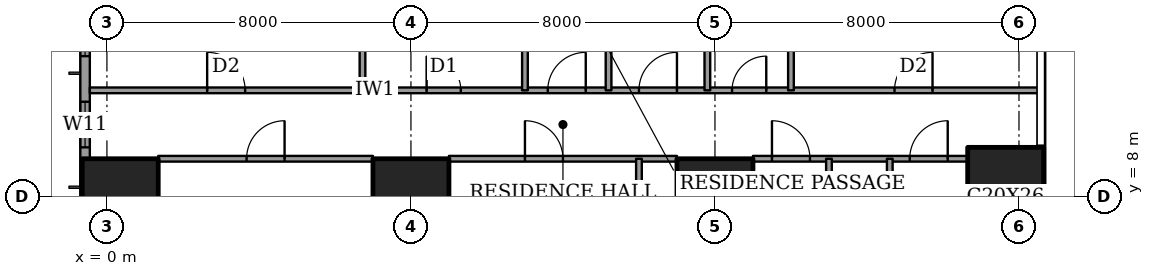
"""IFC4 building model, lengths in metres.
Left out: names, types, materials, properties, quantities, classifications, styles, units other than length and angle.
Written with IfcOpenShell. Run it as: python <this file> out.ifc"""

import sys

from ifc_helpers import new_model, si_unit, direction, frame, frame_2d, origin, origin_2d, place, context, subcontext, project, spatial, rectangle, extrude, element, fill, save


model = new_model("IFC4")
c1 = context("Model", 3, precision=1e-05, world=origin(), true_north=direction((0.0, 1.0)))
c2 = subcontext(c1, "Body", "Model", "MODEL_VIEW")
j1 = project(units=[si_unit("LENGTHUNIT", "METRE"), si_unit("PLANEANGLEUNIT", "RADIAN")], contexts=[c1])
p1 = place(None, origin())
s1 = spatial("IfcSite", under=j1, at=p1, CompositionType="ELEMENT")
p2 = place(p1, origin())
s2 = spatial("IfcBuilding", under=s1, at=p2, CompositionType="ELEMENT")
p3 = place(p2, frame((0.0, 0.0, 96.2)))
s3 = spatial("IfcBuildingStorey", under=s2, at=p3, CompositionType="ELEMENT", Elevation=96.2)
for number, where, z_axis, x_axis in (
    (1, (0.35, 8.0, 0.0), (0.0, 0.0, 1.0), (1.0, 0.0, 0.0)),
    (2, (8.0, 8.0, 0.0), (0.0, 0.0, 1.0), (1.0, 0.0, 0.0)),
    (3, (16.0, 8.0, 0.0), (0.0, 0.0, 1.0), (1.0, 0.0, 0.0)),
):
    element("IfcColumn", number, at=place(p3, frame(where, z_axis=z_axis, x_axis=x_axis)), inside=s3, PredefinedType="COLUMN", context=c2, shape_type="SweptSolid", body=[
        extrude(rectangle(XDim=2.0, YDim=2.0, at=origin_2d()), origin(), (0.0, 0.0, 1.0), 3.6),
    ])
p4 = place(p3, frame((23.65, 8.0, 0.0), z_axis=(0.0, 0.0, 1.0), x_axis=(1.0, 0.0, 0.0)))
e4 = element("IfcColumn", 4, at=p4, inside=s3, PredefinedType="COLUMN", context=c2, shape_type="SweptSolid", body=[
    extrude(rectangle(XDim=2.0, YDim=2.6, at=origin_2d()), origin(), (0.0, 0.0, 1.0), 3.6),
])
p5 = place(p3, frame((-0.575, 44.825, 0.0), z_axis=(0.0, 0.0, 1.0), x_axis=(0.0, -1.0, 0.0)))
e5 = element("IfcWall", 5, at=p5, inside=s3, PredefinedType="SOLIDWALL", context=c2, shape_type="SweptSolid", body=[
    extrude(rectangle(XDim=41.65, YDim=0.25, at=frame_2d((20.825, 0.0))), origin(), (0.0, 0.0, 1.0), 3.6),
])
p6 = place(p5, frame((0.775, 0.0, 0.4)))
e6 = element("IfcOpeningElement", 6, at=p6, cuts=e5, PredefinedType="OPENING", context=c2, shape_type="SweptSolid", body=[
    extrude(rectangle(XDim=2.4, YDim=2.2, at=frame_2d((1.2, 1.1))), frame((0.0, 0.135, 0.0), z_axis=(0.0, -1.0, 0.0), x_axis=(1.0, 0.0, 0.0)), (0.0, 0.0, 1.0), 0.27),
])
p7 = place(p5, frame((6.1, 0.0, 0.4)))
e7 = element("IfcOpeningElement", 7, at=p7, cuts=e5, PredefinedType="OPENING", context=c2, shape_type="SweptSolid", body=[
    extrude(rectangle(XDim=1.2, YDim=2.2, at=frame_2d((0.6, 1.1))), frame((0.0, 0.135, 0.0), z_axis=(0.0, -1.0, 0.0), x_axis=(1.0, 0.0, 0.0)), (0.0, 0.0, 1.0), 0.27),
])
p8 = place(p5, frame((8.425, 0.0, 0.4)))
e8 = element("IfcOpeningElement", 8, at=p8, cuts=e5, PredefinedType="OPENING", context=c2, shape_type="SweptSolid", body=[
    extrude(rectangle(XDim=2.4, YDim=2.2, at=frame_2d((1.2, 1.1))), frame((0.0, 0.135, 0.0), z_axis=(0.0, -1.0, 0.0), x_axis=(1.0, 0.0, 0.0)), (0.0, 0.0, 1.0), 0.27),
])
p9 = place(p5, frame((15.625, 0.0, 0.4)))
e9 = element("IfcOpeningElement", 9, at=p9, cuts=e5, PredefinedType="OPENING", context=c2, shape_type="SweptSolid", body=[
    extrude(rectangle(XDim=2.4, YDim=2.2, at=frame_2d((1.2, 1.1))), frame((0.0, 0.135, 0.0), z_axis=(0.0, -1.0, 0.0), x_axis=(1.0, 0.0, 0.0)), (0.0, 0.0, 1.0), 0.27),
])
p10 = place(p5, frame((23.625, 0.0, 0.4)))
e10 = element("IfcOpeningElement", 10, at=p10, cuts=e5, PredefinedType="OPENING", context=c2, shape_type="SweptSolid", body=[
    extrude(rectangle(XDim=2.4, YDim=2.2, at=frame_2d((1.2, 1.1))), frame((0.0, 0.135, 0.0), z_axis=(0.0, -1.0, 0.0), x_axis=(1.0, 0.0, 0.0)), (0.0, 0.0, 1.0), 0.27),
])
p11 = place(p5, frame((30.725, 0.0, 0.4)))
e11 = element("IfcOpeningElement", 11, at=p11, cuts=e5, PredefinedType="OPENING", context=c2, shape_type="SweptSolid", body=[
    extrude(rectangle(XDim=2.4, YDim=2.2, at=frame_2d((1.2, 1.1))), frame((0.0, 0.135, 0.0), z_axis=(0.0, -1.0, 0.0), x_axis=(1.0, 0.0, 0.0)), (0.0, 0.0, 1.0), 0.27),
])
p12 = place(p5, frame((34.325, 0.0, 0.4)))
e12 = element("IfcOpeningElement", 12, at=p12, cuts=e5, PredefinedType="OPENING", context=c2, shape_type="SweptSolid", body=[
    extrude(rectangle(XDim=1.2, YDim=2.2, at=frame_2d((0.6, 1.1))), frame((0.0, 0.135, 0.0), z_axis=(0.0, -1.0, 0.0), x_axis=(1.0, 0.0, 0.0)), (0.0, 0.0, 1.0), 0.27),
])
p13 = place(p5, frame((38.475, 0.0, 0.4)))
e13 = element("IfcOpeningElement", 13, at=p13, cuts=e5, PredefinedType="OPENING", context=c2, shape_type="SweptSolid", body=[
    extrude(rectangle(XDim=2.4, YDim=2.2, at=frame_2d((1.2, 1.1))), frame((0.0, 0.135, 0.0), z_axis=(0.0, -1.0, 0.0), x_axis=(1.0, 0.0, 0.0)), (0.0, 0.0, 1.0), 0.27),
])
p14 = place(p3, frame((1.35, 9.0, 0.0), z_axis=(0.0, 0.0, 1.0), x_axis=(1.0, 0.0, 0.0)))
e14 = element("IfcWall", 14, at=p14, inside=s3, PredefinedType="PARTITIONING", context=c2, shape_type="SweptSolid", body=[
    extrude(rectangle(XDim=5.65, YDim=0.15, at=frame_2d((2.825, 0.0))), origin(), (0.0, 0.0, 1.0), 3.35),
])
p15 = place(p14, frame((2.325, 0.0, 0.0)))
e15 = element("IfcOpeningElement", 15, at=p15, cuts=e14, PredefinedType="OPENING", context=c2, shape_type="SweptSolid", body=[
    extrude(rectangle(XDim=1.0, YDim=2.1, at=frame_2d((0.5, 1.05))), frame((0.0, 0.085, 0.0), z_axis=(0.0, -1.0, 0.0), x_axis=(1.0, 0.0, 0.0)), (0.0, 0.0, 1.0), 0.17),
])
p16 = place(p3, frame((9.0, 9.0, 0.0), z_axis=(0.0, 0.0, 1.0), x_axis=(1.0, 0.0, 0.0)))
e16 = element("IfcWall", 16, at=p16, inside=s3, PredefinedType="PARTITIONING", context=c2, shape_type="SweptSolid", body=[
    extrude(rectangle(XDim=6.0, YDim=0.15, at=frame_2d((3.0, 0.0))), origin(), (0.0, 0.0, 1.0), 3.35),
])
p17 = place(p16, frame((2.0, 0.0, 0.0)))
e17 = element("IfcOpeningElement", 17, at=p17, cuts=e16, PredefinedType="OPENING", context=c2, shape_type="SweptSolid", body=[
    extrude(rectangle(XDim=1.0, YDim=2.1, at=frame_2d((0.5, 1.05))), frame((0.0, 0.085, 0.0), z_axis=(0.0, -1.0, 0.0), x_axis=(1.0, 0.0, 0.0)), (0.0, 0.0, 1.0), 0.17),
])
p18 = place(p3, frame((17.0, 9.0, 0.0), z_axis=(0.0, 0.0, 1.0), x_axis=(1.0, 0.0, 0.0)))
e18 = element("IfcWall", 18, at=p18, inside=s3, PredefinedType="PARTITIONING", context=c2, shape_type="SweptSolid", body=[
    extrude(rectangle(XDim=5.65, YDim=0.15, at=frame_2d((2.825, 0.0))), origin(), (0.0, 0.0, 1.0), 3.35),
])
p19 = place(p18, frame((0.5, 0.0, 0.0)))
e19 = element("IfcOpeningElement", 19, at=p19, cuts=e18, PredefinedType="OPENING", context=c2, shape_type="SweptSolid", body=[
    extrude(rectangle(XDim=1.0, YDim=2.1, at=frame_2d((0.5, 1.05))), frame((0.0, 0.085, 0.0), z_axis=(0.0, -1.0, 0.0), x_axis=(1.0, 0.0, 0.0)), (0.0, 0.0, 1.0), 0.17),
])
p20 = place(p18, frame((4.125, 0.0, 0.0)))
e20 = element("IfcOpeningElement", 20, at=p20, cuts=e18, PredefinedType="OPENING", context=c2, shape_type="SweptSolid", body=[
    extrude(rectangle(XDim=1.0, YDim=2.1, at=frame_2d((0.5, 1.05))), frame((0.0, 0.085, 0.0), z_axis=(0.0, -1.0, 0.0), x_axis=(1.0, 0.0, 0.0)), (0.0, 0.0, 1.0), 0.17),
])
p21 = place(p3, frame((-0.45, 10.8, 0.0), z_axis=(0.0, 0.0, 1.0), x_axis=(1.0, 0.0, 0.0)))
e21 = element("IfcWall", 21, at=p21, inside=s3, PredefinedType="PARTITIONING", context=c2, shape_type="SweptSolid", body=[
    extrude(rectangle(XDim=25.011, YDim=0.15, at=frame_2d((12.505, 0.0))), origin(), (0.0, 0.0, 1.0), 3.35),
])
p22 = place(p21, frame((12.05, 0.0, 0.0)))
e22 = element("IfcOpeningElement", 22, at=p22, cuts=e21, PredefinedType="OPENING", context=c2, shape_type="SweptSolid", body=[
    extrude(rectangle(XDim=1.0, YDim=2.1, at=frame_2d((0.5, 1.05))), frame((0.0, 0.085, 0.0), z_axis=(0.0, -1.0, 0.0), x_axis=(1.0, 0.0, 0.0)), (0.0, 0.0, 1.0), 0.17),
])
p23 = place(p21, frame((3.087, 0.0, 0.0)))
e23 = element("IfcOpeningElement", 23, at=p23, cuts=e21, PredefinedType="OPENING", context=c2, shape_type="SweptSolid", body=[
    extrude(rectangle(XDim=1.0, YDim=2.1, at=frame_2d((0.5, 1.05))), frame((0.0, 0.085, 0.0), z_axis=(0.0, -1.0, 0.0), x_axis=(1.0, 0.0, 0.0)), (0.0, 0.0, 1.0), 0.17),
])
p24 = place(p21, frame((8.863, 0.0, 0.0)))
e24 = element("IfcOpeningElement", 24, at=p24, cuts=e21, PredefinedType="OPENING", context=c2, shape_type="SweptSolid", body=[
    extrude(rectangle(XDim=0.9, YDim=2.1, at=frame_2d((0.45, 1.05))), frame((0.0, 0.085, 0.0), z_axis=(0.0, -1.0, 0.0), x_axis=(1.0, 0.0, 0.0)), (0.0, 0.0, 1.0), 0.17),
])
p25 = place(p21, frame((14.45, 0.0, 0.0)))
e25 = element("IfcOpeningElement", 25, at=p25, cuts=e21, PredefinedType="OPENING", context=c2, shape_type="SweptSolid", body=[
    extrude(rectangle(XDim=1.0, YDim=2.1, at=frame_2d((0.5, 1.05))), frame((0.0, 0.085, 0.0), z_axis=(0.0, -1.0, 0.0), x_axis=(1.0, 0.0, 0.0)), (0.0, 0.0, 1.0), 0.17),
])
p26 = place(p21, frame((16.9, 0.0, 0.0)))
e26 = element("IfcOpeningElement", 26, at=p26, cuts=e21, PredefinedType="OPENING", context=c2, shape_type="SweptSolid", body=[
    extrude(rectangle(XDim=0.9, YDim=2.1, at=frame_2d((0.45, 1.05))), frame((0.0, 0.085, 0.0), z_axis=(0.0, -1.0, 0.0), x_axis=(1.0, 0.0, 0.0)), (0.0, 0.0, 1.0), 0.17),
])
p27 = place(p21, frame((21.175, 0.0, 0.0)))
e27 = element("IfcOpeningElement", 27, at=p27, cuts=e21, PredefinedType="OPENING", context=c2, shape_type="SweptSolid", body=[
    extrude(rectangle(XDim=1.0, YDim=2.1, at=frame_2d((0.5, 1.05))), frame((0.0, 0.085, 0.0), z_axis=(0.0, -1.0, 0.0), x_axis=(1.0, 0.0, 0.0)), (0.0, 0.0, 1.0), 0.17),
])
p28 = place(p3, frame((6.725, 10.8, 0.0), z_axis=(0.0, 0.0, 1.0), x_axis=(0.0, 1.0, 0.0)))
e28 = element("IfcWall", 28, at=p28, inside=s3, PredefinedType="PARTITIONING", context=c2, shape_type="SweptSolid", body=[
    extrude(rectangle(XDim=4.0, YDim=0.15, at=frame_2d((2.0, 0.0))), origin(), (0.0, 0.0, 1.0), 3.35),
])
p29 = place(p3, frame((11.0, 10.8, 0.0), z_axis=(0.0, 0.0, 1.0), x_axis=(0.0, 1.0, 0.0)))
e29 = element("IfcWall", 29, at=p29, inside=s3, PredefinedType="PARTITIONING", context=c2, shape_type="SweptSolid", body=[
    extrude(rectangle(XDim=10.8, YDim=0.15, at=frame_2d((5.4, 0.0))), origin(), (0.0, 0.0, 1.0), 3.35),
])
p30 = place(p29, frame((8.0, 0.0, 0.0)))
e30 = element("IfcOpeningElement", 30, at=p30, cuts=e29, PredefinedType="OPENING", context=c2, shape_type="SweptSolid", body=[
    extrude(rectangle(XDim=1.0, YDim=2.1, at=frame_2d((0.5, 1.05))), frame((0.0, 0.085, 0.0), z_axis=(0.0, -1.0, 0.0), x_axis=(1.0, 0.0, 0.0)), (0.0, 0.0, 1.0), 0.17),
])
p31 = place(p3, frame((13.2, 10.8, 0.0), z_axis=(0.0, 0.0, 1.0), x_axis=(0.0, 1.0, 0.0)))
e31 = element("IfcWall", 31, at=p31, inside=s3, PredefinedType="PARTITIONING", context=c2, shape_type="SweptSolid", body=[
    extrude(rectangle(XDim=6.2, YDim=0.15, at=frame_2d((3.1, 0.0))), origin(), (0.0, 0.0, 1.0), 3.35),
])
p32 = place(p3, frame((14.0, -0.45, 0.0), z_axis=(0.0, 0.0, 1.0), x_axis=(0.0, 1.0, 0.0)))
e32 = element("IfcWall", 32, at=p32, inside=s3, PredefinedType="PARTITIONING", context=c2, shape_type="SweptSolid", body=[
    extrude(rectangle(XDim=9.45, YDim=0.15, at=frame_2d((4.725, 0.0))), origin(), (0.0, 0.0, 1.0), 3.35),
])
p33 = place(p3, frame((15.8, 10.8, 0.0), z_axis=(0.0, 0.0, 1.0), x_axis=(0.0, 1.0, 0.0)))
e33 = element("IfcWall", 33, at=p33, inside=s3, PredefinedType="PARTITIONING", context=c2, shape_type="SweptSolid", body=[
    extrude(rectangle(XDim=4.0, YDim=0.15, at=frame_2d((2.0, 0.0))), origin(), (0.0, 0.0, 1.0), 3.35),
])
p34 = place(p3, frame((18.0, 10.8, 0.0), z_axis=(0.0, 0.0, 1.0), x_axis=(0.0, 1.0, 0.0)))
e34 = element("IfcWall", 34, at=p34, inside=s3, PredefinedType="PARTITIONING", context=c2, shape_type="SweptSolid", body=[
    extrude(rectangle(XDim=6.2, YDim=0.15, at=frame_2d((3.1, 0.0))), origin(), (0.0, 0.0, 1.0), 3.35),
])
p35 = place(p3, frame((19.0, -0.45, 0.0), z_axis=(0.0, 0.0, 1.0), x_axis=(0.0, 1.0, 0.0)))
e35 = element("IfcWall", 35, at=p35, inside=s3, PredefinedType="PARTITIONING", context=c2, shape_type="SweptSolid", body=[
    extrude(rectangle(XDim=9.45, YDim=0.15, at=frame_2d((4.725, 0.0))), origin(), (0.0, 0.0, 1.0), 3.35),
])
p36 = place(p3, frame((20.6, -0.45, 0.0), z_axis=(0.0, 0.0, 1.0), x_axis=(0.0, 1.0, 0.0)))
e36 = element("IfcWall", 36, at=p36, inside=s3, PredefinedType="PARTITIONING", context=c2, shape_type="SweptSolid", body=[
    extrude(rectangle(XDim=9.45, YDim=0.15, at=frame_2d((4.725, 0.0))), origin(), (0.0, 0.0, 1.0), 3.35),
])
p37 = place(p36, frame((4.275, 0.0, 0.0)))
e37 = element("IfcOpeningElement", 37, at=p37, cuts=e36, PredefinedType="OPENING", context=c2, shape_type="SweptSolid", body=[
    extrude(rectangle(XDim=0.9, YDim=2.1, at=frame_2d((0.45, 1.05))), frame((0.0, 0.085, 0.0), z_axis=(0.0, -1.0, 0.0), x_axis=(1.0, 0.0, 0.0)), (0.0, 0.0, 1.0), 0.17),
])
p38 = place(p11, origin())
e38 = element("IfcWindow", 38, at=p38, inside=s3, PartitioningType="SINGLE_PANEL", PredefinedType="WINDOW", context=c2, shape_type="SweptSolid", body=[
    extrude(rectangle(XDim=2.4, YDim=2.2, at=frame_2d((1.2, 1.1))), frame((0.0, 0.03, 0.0), z_axis=(0.0, -1.0, 0.0), x_axis=(1.0, 0.0, 0.0)), (0.0, 0.0, 1.0), 0.06),
])
fill(e11, e38)
p39 = place(p12, origin())
e39 = element("IfcWindow", 39, at=p39, inside=s3, PartitioningType="SINGLE_PANEL", PredefinedType="WINDOW", context=c2, shape_type="SweptSolid", body=[
    extrude(rectangle(XDim=1.2, YDim=2.2, at=frame_2d((0.6, 1.1))), frame((0.0, 0.03, 0.0), z_axis=(0.0, -1.0, 0.0), x_axis=(1.0, 0.0, 0.0)), (0.0, 0.0, 1.0), 0.06),
])
fill(e12, e39)
p40 = place(p15, origin())
e40 = element("IfcDoor", 40, at=p40, inside=s3, OperationType="SINGLE_SWING_LEFT", PredefinedType="DOOR", context=c2, shape_type="SweptSolid", body=[
    extrude(rectangle(XDim=1.0, YDim=2.1, at=frame_2d((0.5, 1.05))), frame((0.0, 0.025, 0.0), z_axis=(0.0, -1.0, 0.0), x_axis=(1.0, 0.0, 0.0)), (0.0, 0.0, 1.0), 0.05),
])
fill(e15, e40)
p41 = place(p17, origin())
e41 = element("IfcDoor", 41, at=p41, inside=s3, OperationType="SINGLE_SWING_RIGHT", PredefinedType="DOOR", context=c2, shape_type="SweptSolid", body=[
    extrude(rectangle(XDim=1.0, YDim=2.1, at=frame_2d((0.5, 1.05))), frame((0.0, 0.025, 0.0), z_axis=(0.0, -1.0, 0.0), x_axis=(1.0, 0.0, 0.0)), (0.0, 0.0, 1.0), 0.05),
])
fill(e17, e41)
p42 = place(p19, origin())
e42 = element("IfcDoor", 42, at=p42, inside=s3, OperationType="SINGLE_SWING_RIGHT", PredefinedType="DOOR", context=c2, shape_type="SweptSolid", body=[
    extrude(rectangle(XDim=1.0, YDim=2.1, at=frame_2d((0.5, 1.05))), frame((0.0, 0.025, 0.0), z_axis=(0.0, -1.0, 0.0), x_axis=(1.0, 0.0, 0.0)), (0.0, 0.0, 1.0), 0.05),
])
fill(e19, e42)
p43 = place(p20, origin())
e43 = element("IfcDoor", 43, at=p43, inside=s3, OperationType="SINGLE_SWING_LEFT", PredefinedType="DOOR", context=c2, shape_type="SweptSolid", body=[
    extrude(rectangle(XDim=1.0, YDim=2.1, at=frame_2d((0.5, 1.05))), frame((0.0, 0.025, 0.0), z_axis=(0.0, -1.0, 0.0), x_axis=(1.0, 0.0, 0.0)), (0.0, 0.0, 1.0), 0.05),
])
fill(e20, e43)
p44 = place(p22, origin())
e44 = element("IfcDoor", 44, at=p44, inside=s3, OperationType="SINGLE_SWING_LEFT", PredefinedType="DOOR", context=c2, shape_type="SweptSolid", body=[
    extrude(rectangle(XDim=1.0, YDim=2.1, at=frame_2d((0.5, 1.05))), frame((0.0, 0.025, 0.0), z_axis=(0.0, -1.0, 0.0), x_axis=(1.0, 0.0, 0.0)), (0.0, 0.0, 1.0), 0.05),
])
fill(e22, e44)
p45 = place(p23, origin())
e45 = element("IfcDoor", 45, at=p45, inside=s3, OperationType="SINGLE_SWING_RIGHT", PredefinedType="DOOR", context=c2, shape_type="SweptSolid", body=[
    extrude(rectangle(XDim=1.0, YDim=2.1, at=frame_2d((0.5, 1.05))), frame((0.0, 0.025, 0.0), z_axis=(0.0, -1.0, 0.0), x_axis=(1.0, 0.0, 0.0)), (0.0, 0.0, 1.0), 0.05),
])
fill(e23, e45)
p46 = place(p24, origin())
e46 = element("IfcDoor", 46, at=p46, inside=s3, OperationType="SINGLE_SWING_RIGHT", PredefinedType="DOOR", context=c2, shape_type="SweptSolid", body=[
    extrude(rectangle(XDim=0.9, YDim=2.1, at=frame_2d((0.45, 1.05))), frame((0.0, 0.025, 0.0), z_axis=(0.0, -1.0, 0.0), x_axis=(1.0, 0.0, 0.0)), (0.0, 0.0, 1.0), 0.05),
])
fill(e24, e46)
p47 = place(p25, origin())
e47 = element("IfcDoor", 47, at=p47, inside=s3, OperationType="SINGLE_SWING_LEFT", PredefinedType="DOOR", context=c2, shape_type="SweptSolid", body=[
    extrude(rectangle(XDim=1.0, YDim=2.1, at=frame_2d((0.5, 1.05))), frame((0.0, 0.025, 0.0), z_axis=(0.0, -1.0, 0.0), x_axis=(1.0, 0.0, 0.0)), (0.0, 0.0, 1.0), 0.05),
])
fill(e25, e47)
p48 = place(p26, origin())
e48 = element("IfcDoor", 48, at=p48, inside=s3, OperationType="SINGLE_SWING_LEFT", PredefinedType="DOOR", context=c2, shape_type="SweptSolid", body=[
    extrude(rectangle(XDim=0.9, YDim=2.1, at=frame_2d((0.45, 1.05))), frame((0.0, 0.025, 0.0), z_axis=(0.0, -1.0, 0.0), x_axis=(1.0, 0.0, 0.0)), (0.0, 0.0, 1.0), 0.05),
])
fill(e26, e48)
p49 = place(p27, origin())
e49 = element("IfcDoor", 49, at=p49, inside=s3, OperationType="SINGLE_SWING_LEFT", PredefinedType="DOOR", context=c2, shape_type="SweptSolid", body=[
    extrude(rectangle(XDim=1.0, YDim=2.1, at=frame_2d((0.5, 1.05))), frame((0.0, 0.025, 0.0), z_axis=(0.0, -1.0, 0.0), x_axis=(1.0, 0.0, 0.0)), (0.0, 0.0, 1.0), 0.05),
])
fill(e27, e49)
save(model, sys.argv[1])
